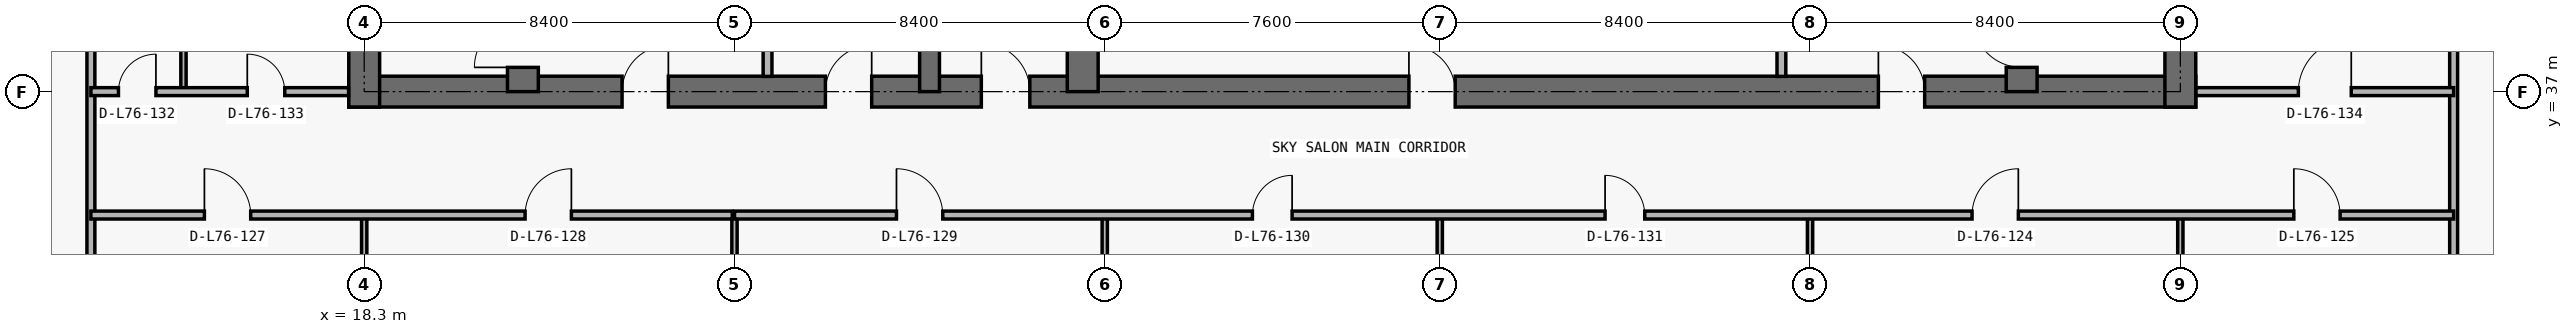
"""IFC4 building model, lengths in metres.
Left out: names, types, materials, properties, quantities, classifications, styles, units other than length and angle.
Written with IfcOpenShell. Run it as: python <this file> out.ifc"""

import sys

from ifc_helpers import new_model, si_unit, direction, frame, frame_2d, origin, place, context, subcontext, project, spatial, rectangle, extrude, element, fill, save


model = new_model("IFC4")
c1 = context("Model", 3, precision=1e-05, world=origin(), true_north=direction((0.0, 1.0)))
c2 = subcontext(c1, "Body", "Model", "MODEL_VIEW")
j1 = project(units=[si_unit("LENGTHUNIT", "METRE"), si_unit("PLANEANGLEUNIT", "RADIAN")], contexts=[c1])
p1 = place(None, origin())
s1 = spatial("IfcSite", under=j1, at=p1, CompositionType="ELEMENT")
p2 = place(p1, origin())
s2 = spatial("IfcBuilding", under=s1, at=p2, CompositionType="ELEMENT")
p3 = place(p2, frame((0.0, 0.0, 269.4)))
s3 = spatial("IfcBuildingStorey", under=s2, at=p3, CompositionType="ELEMENT", Elevation=269.4)
p4 = place(p3, frame((17.95, 37.0, 0.0), z_axis=(0.0, 0.0, 1.0), x_axis=(1.0, 0.0, 0.0)))
e1 = element("IfcWall", 1, at=p4, inside=s3, PredefinedType="SHEAR", context=c2, shape_type="SweptSolid", body=[
    extrude(rectangle(XDim=41.9, YDim=0.7, at=frame_2d((20.95, 0.0))), origin(), (0.0, 0.0, 1.0), 4.5),
])
p5 = place(p4, frame((14.35, 0.0, 0.0)))
e2 = element("IfcOpeningElement", 2, at=p5, cuts=e1, PredefinedType="OPENING", context=c2, shape_type="SweptSolid", body=[
    extrude(rectangle(XDim=1.1, YDim=2.15, at=frame_2d((0.55, 1.075))), frame((0.0, 0.36, 0.0), z_axis=(0.0, -1.0, 0.0), x_axis=(1.0, 0.0, 0.0)), (0.0, 0.0, 1.0), 0.72),
])
p6 = place(p4, frame((6.2, 0.0, 0.0)))
e3 = element("IfcOpeningElement", 3, at=p6, cuts=e1, PredefinedType="OPENING", context=c2, shape_type="SweptSolid", body=[
    extrude(rectangle(XDim=1.05, YDim=2.15, at=frame_2d((0.525, 1.075))), frame((0.0, 0.36, 0.0), z_axis=(0.0, -1.0, 0.0), x_axis=(1.0, 0.0, 0.0)), (0.0, 0.0, 1.0), 0.72),
])
p7 = place(p4, frame((34.7, 0.0, 0.0)))
e4 = element("IfcOpeningElement", 4, at=p7, cuts=e1, PredefinedType="OPENING", context=c2, shape_type="SweptSolid", body=[
    extrude(rectangle(XDim=1.05, YDim=2.15, at=frame_2d((0.525, 1.075))), frame((0.0, 0.36, 0.0), z_axis=(0.0, -1.0, 0.0), x_axis=(1.0, 0.0, 0.0)), (0.0, 0.0, 1.0), 0.72),
])
p8 = place(p4, frame((10.812, 0.0, 0.0)))
e5 = element("IfcOpeningElement", 5, at=p8, cuts=e1, PredefinedType="OPENING", context=c2, shape_type="SweptSolid", body=[
    extrude(rectangle(XDim=1.05, YDim=2.15, at=frame_2d((0.525, 1.075))), frame((0.0, 0.36, 0.0), z_axis=(0.0, -1.0, 0.0), x_axis=(1.0, 0.0, 0.0)), (0.0, 0.0, 1.0), 0.72),
])
p9 = place(p4, frame((24.05, 0.0, 0.0)))
e6 = element("IfcOpeningElement", 6, at=p9, cuts=e1, PredefinedType="OPENING", context=c2, shape_type="SweptSolid", body=[
    extrude(rectangle(XDim=1.05, YDim=2.15, at=frame_2d((0.525, 1.075))), frame((0.0, 0.36, 0.0), z_axis=(0.0, -1.0, 0.0), x_axis=(1.0, 0.0, 0.0)), (0.0, 0.0, 1.0), 0.72),
])
for number, where, z_axis, x_axis in (
    (7, (18.3, 36.65, 0.0), (0.0, 0.0, 1.0), (0.0, 1.0, 0.0)),
    (8, (59.5, 36.65, 0.0), (0.0, 0.0, 1.0), (0.0, 1.0, 0.0)),
):
    element("IfcWall", number, at=place(p3, frame(where, z_axis=z_axis, x_axis=x_axis)), inside=s3, PredefinedType="SHEAR", context=c2, shape_type="SweptSolid", body=[
        extrude(rectangle(XDim=13.95, YDim=0.7, at=frame_2d((6.975, 0.0))), origin(), (0.0, 0.0, 1.0), 4.5),
    ])
p10 = place(p3, frame((21.9, 37.0, 0.0), z_axis=(0.0, 0.0, 1.0), x_axis=(0.0, 1.0, 0.0)))
e9 = element("IfcWall", 9, at=p10, inside=s3, PredefinedType="SHEAR", context=c2, shape_type="SweptSolid", body=[
    extrude(rectangle(XDim=9.575, YDim=0.7, at=frame_2d((4.788, 0.0))), origin(), (0.0, 0.0, 1.0), 4.5),
])
p11 = place(p10, frame((0.55, 0.0, 0.0)))
e10 = element("IfcOpeningElement", 10, at=p11, cuts=e9, PredefinedType="OPENING", context=c2, shape_type="SweptSolid", body=[
    extrude(rectangle(XDim=1.1, YDim=2.15, at=frame_2d((0.55, 1.075))), frame((0.0, 0.36, 0.0), z_axis=(0.0, -1.0, 0.0), x_axis=(1.0, 0.0, 0.0)), (0.0, 0.0, 1.0), 0.72),
])
p12 = place(p3, frame((55.9, 37.0, 0.0), z_axis=(0.0, 0.0, 1.0), x_axis=(0.0, 1.0, 0.0)))
e11 = element("IfcWall", 11, at=p12, inside=s3, PredefinedType="SHEAR", context=c2, shape_type="SweptSolid", body=[
    extrude(rectangle(XDim=9.575, YDim=0.7, at=frame_2d((4.788, 0.0))), origin(), (0.0, 0.0, 1.0), 4.5),
])
p13 = place(p12, frame((0.55, 0.0, 0.0)))
e12 = element("IfcOpeningElement", 12, at=p13, cuts=e11, PredefinedType="OPENING", context=c2, shape_type="SweptSolid", body=[
    extrude(rectangle(XDim=1.1, YDim=2.15, at=frame_2d((0.55, 1.075))), frame((0.0, 0.36, 0.0), z_axis=(0.0, -1.0, 0.0), x_axis=(1.0, 0.0, 0.0)), (0.0, 0.0, 1.0), 0.72),
])
p14 = place(p3, frame((31.125, 37.0, 0.0), z_axis=(0.0, 0.0, 1.0), x_axis=(0.0, 1.0, 0.0)))
e13 = element("IfcWall", 13, at=p14, inside=s3, PredefinedType="SHEAR", context=c2, shape_type="SweptSolid", body=[
    extrude(rectangle(XDim=9.575, YDim=0.45, at=frame_2d((4.788, 0.0))), origin(), (0.0, 0.0, 1.0), 4.5),
])
p15 = place(p3, frame((34.6, 37.0, 0.0), z_axis=(0.0, 0.0, 1.0), x_axis=(0.0, 1.0, 0.0)))
e14 = element("IfcWall", 14, at=p15, inside=s3, PredefinedType="SHEAR", context=c2, shape_type="SweptSolid", body=[
    extrude(rectangle(XDim=9.575, YDim=0.7, at=frame_2d((4.788, 0.0))), origin(), (0.0, 0.0, 1.0), 4.5),
])
p16 = place(p3, frame((12.1, 13.385, 0.0), z_axis=(0.0, 0.0, 1.0), x_axis=(0.0, 1.0, 0.0)))
e15 = element("IfcWall", 15, at=p16, inside=s3, PredefinedType="PARTITIONING", context=c2, shape_type="SweptSolid", body=[
    extrude(rectangle(XDim=33.495, YDim=0.18, at=frame_2d((16.748, 0.0))), origin(), (0.0, 0.0, 1.0), 4.5),
])
p17 = place(p3, frame((14.2, 37.0, 0.0), z_axis=(0.0, 0.0, 1.0), x_axis=(0.0, 1.0, 0.0)))
e16 = element("IfcWall", 16, at=p17, inside=s3, PredefinedType="PARTITIONING", context=c2, shape_type="SweptSolid", body=[
    extrude(rectangle(XDim=6.8, YDim=0.12, at=frame_2d((3.4, 0.0))), origin(), (0.0, 0.0, 1.0), 4.5),
])
p18 = place(p3, frame((18.3, 9.995, 0.0), z_axis=(0.0, 0.0, 1.0), x_axis=(0.0, 1.0, 0.0)))
e17 = element("IfcWall", 17, at=p18, inside=s3, PredefinedType="PARTITIONING", context=c2, shape_type="SweptSolid", body=[
    extrude(rectangle(XDim=24.205, YDim=0.12, at=frame_2d((12.103, 0.0))), origin(), (0.0, 0.0, 1.0), 3.464),
])
p19 = place(p3, frame((26.7, 29.405, 0.0), z_axis=(0.0, 0.0, 1.0), x_axis=(0.0, 1.0, 0.0)))
e18 = element("IfcWall", 18, at=p19, inside=s3, PredefinedType="PARTITIONING", context=c2, shape_type="SweptSolid", body=[
    extrude(rectangle(XDim=4.795, YDim=0.12, at=frame_2d((2.397, 0.0))), origin(), (0.0, 0.0, 1.0), 3.785),
])
p20 = place(p3, frame((27.45, 37.345, 0.0), z_axis=(0.0, 0.0, 1.0), x_axis=(0.0, 1.0, 0.0)))
e19 = element("IfcWall", 19, at=p20, inside=s3, PredefinedType="PARTITIONING", context=c2, shape_type="SweptSolid", body=[
    extrude(rectangle(XDim=5.385, YDim=0.2, at=frame_2d((2.692, 0.0))), origin(), (0.0, 0.0, 1.0), 4.5),
])
for number, where, z_axis, x_axis in (
    (20, (35.1, 9.955, 0.0), (0.0, 0.0, 1.0), (0.0, 1.0, 0.0)),
    (21, (42.7, 9.955, 0.0), (0.0, 0.0, 1.0), (0.0, 1.0, 0.0)),
):
    element("IfcWall", number, at=place(p3, frame(where, z_axis=z_axis, x_axis=x_axis)), inside=s3, PredefinedType="PARTITIONING", context=c2, shape_type="SweptSolid", body=[
        extrude(rectangle(XDim=24.245, YDim=0.12, at=frame_2d((12.123, 0.0))), origin(), (0.0, 0.0, 1.0), 3.464),
    ])
p21 = place(p3, frame((50.45, 37.345, 0.0), z_axis=(0.0, 0.0, 1.0), x_axis=(0.0, 1.0, 0.0)))
e22 = element("IfcWall", 22, at=p21, inside=s3, PredefinedType="PARTITIONING", context=c2, shape_type="SweptSolid", body=[
    extrude(rectangle(XDim=5.385, YDim=0.2, at=frame_2d((2.692, 0.0))), origin(), (0.0, 0.0, 1.0), 4.5),
])
p22 = place(p3, frame((51.1, 29.405, 0.0), z_axis=(0.0, 0.0, 1.0), x_axis=(0.0, 1.0, 0.0)))
e23 = element("IfcWall", 23, at=p22, inside=s3, PredefinedType="PARTITIONING", context=c2, shape_type="SweptSolid", body=[
    extrude(rectangle(XDim=4.795, YDim=0.12, at=frame_2d((2.397, 0.0))), origin(), (0.0, 0.0, 1.0), 3.785),
])
p23 = place(p3, frame((59.5, 9.995, 0.0), z_axis=(0.0, 0.0, 1.0), x_axis=(0.0, 1.0, 0.0)))
e24 = element("IfcWall", 24, at=p23, inside=s3, PredefinedType="PARTITIONING", context=c2, shape_type="SweptSolid", body=[
    extrude(rectangle(XDim=24.205, YDim=0.12, at=frame_2d((12.103, 0.0))), origin(), (0.0, 0.0, 1.0), 3.464),
])
p24 = place(p3, frame((65.7, 13.42, 0.0), z_axis=(0.0, 0.0, 1.0), x_axis=(0.0, 1.0, 0.0)))
e25 = element("IfcWall", 25, at=p24, inside=s3, PredefinedType="PARTITIONING", context=c2, shape_type="SweptSolid", body=[
    extrude(rectangle(XDim=33.46, YDim=0.18, at=frame_2d((16.73, 0.0))), origin(), (0.0, 0.0, 1.0), 4.5),
])
p25 = place(p3, frame((12.1, 34.2, 0.0), z_axis=(0.0, 0.0, 1.0), x_axis=(1.0, 0.0, 0.0)))
e26 = element("IfcWall", 26, at=p25, inside=s3, PredefinedType="PARTITIONING", context=c2, shape_type="SweptSolid", body=[
    extrude(rectangle(XDim=14.55, YDim=0.18, at=frame_2d((7.275, 0.0))), origin(), (0.0, 0.0, 1.0), 4.5),
])
p26 = place(p25, frame((2.575, 0.0, 0.0)))
e27 = element("IfcOpeningElement", 27, at=p26, cuts=e26, PredefinedType="OPENING", context=c2, shape_type="SweptSolid", body=[
    extrude(rectangle(XDim=1.05, YDim=2.15, at=frame_2d((0.525, 1.075))), frame((0.0, 0.1, 0.0), z_axis=(0.0, -1.0, 0.0), x_axis=(1.0, 0.0, 0.0)), (0.0, 0.0, 1.0), 0.2),
])
p27 = place(p25, frame((9.85, 0.0, 0.0)))
e28 = element("IfcOpeningElement", 28, at=p27, cuts=e26, PredefinedType="OPENING", context=c2, shape_type="SweptSolid", body=[
    extrude(rectangle(XDim=1.05, YDim=2.15, at=frame_2d((0.525, 1.075))), frame((0.0, 0.1, 0.0), z_axis=(0.0, -1.0, 0.0), x_axis=(1.0, 0.0, 0.0)), (0.0, 0.0, 1.0), 0.2),
])
p28 = place(p3, frame((26.7, 34.2, 0.0), z_axis=(0.0, 0.0, 1.0), x_axis=(1.0, 0.0, 0.0)))
e29 = element("IfcWall", 29, at=p28, inside=s3, PredefinedType="PARTITIONING", context=c2, shape_type="SweptSolid", body=[
    extrude(rectangle(XDim=39.0, YDim=0.18, at=frame_2d((19.5, 0.0))), origin(), (0.0, 0.0, 1.0), 4.5),
])
p29 = place(p28, frame((28.075, 0.0, 0.0)))
e30 = element("IfcOpeningElement", 30, at=p29, cuts=e29, PredefinedType="OPENING", context=c2, shape_type="SweptSolid", body=[
    extrude(rectangle(XDim=1.05, YDim=2.15, at=frame_2d((0.525, 1.075))), frame((0.0, 0.1, 0.0), z_axis=(0.0, -1.0, 0.0), x_axis=(1.0, 0.0, 0.0)), (0.0, 0.0, 1.0), 0.2),
])
p30 = place(p28, frame((35.375, 0.0, 0.0)))
e31 = element("IfcOpeningElement", 31, at=p30, cuts=e29, PredefinedType="OPENING", context=c2, shape_type="SweptSolid", body=[
    extrude(rectangle(XDim=1.05, YDim=2.15, at=frame_2d((0.525, 1.075))), frame((0.0, 0.1, 0.0), z_axis=(0.0, -1.0, 0.0), x_axis=(1.0, 0.0, 0.0)), (0.0, 0.0, 1.0), 0.2),
])
p31 = place(p28, frame((3.675, 0.0, 0.0)))
e32 = element("IfcOpeningElement", 32, at=p31, cuts=e29, PredefinedType="OPENING", context=c2, shape_type="SweptSolid", body=[
    extrude(rectangle(XDim=1.05, YDim=2.15, at=frame_2d((0.525, 1.075))), frame((0.0, 0.1, 0.0), z_axis=(0.0, -1.0, 0.0), x_axis=(1.0, 0.0, 0.0)), (0.0, 0.0, 1.0), 0.2),
])
p32 = place(p28, frame((11.75, 0.0, 0.0)))
e33 = element("IfcOpeningElement", 33, at=p32, cuts=e29, PredefinedType="OPENING", context=c2, shape_type="SweptSolid", body=[
    extrude(rectangle(XDim=0.9, YDim=2.15, at=frame_2d((0.45, 1.075))), frame((0.0, 0.1, 0.0), z_axis=(0.0, -1.0, 0.0), x_axis=(1.0, 0.0, 0.0)), (0.0, 0.0, 1.0), 0.2),
])
p33 = place(p28, frame((19.75, 0.0, 0.0)))
e34 = element("IfcOpeningElement", 34, at=p33, cuts=e29, PredefinedType="OPENING", context=c2, shape_type="SweptSolid", body=[
    extrude(rectangle(XDim=0.9, YDim=2.15, at=frame_2d((0.45, 1.075))), frame((0.0, 0.1, 0.0), z_axis=(0.0, -1.0, 0.0), x_axis=(1.0, 0.0, 0.0)), (0.0, 0.0, 1.0), 0.2),
])
p34 = place(p3, frame((12.1, 37.0, 0.0), z_axis=(0.0, 0.0, 1.0), x_axis=(1.0, 0.0, 0.0)))
e35 = element("IfcWall", 35, at=p34, inside=s3, PredefinedType="PARTITIONING", context=c2, shape_type="SweptSolid", body=[
    extrude(rectangle(XDim=5.845, YDim=0.18, at=frame_2d((2.922, 0.0))), origin(), (0.0, 0.0, 1.0), 4.5),
])
p35 = place(p34, frame((0.625, 0.0, 0.0)))
e36 = element("IfcOpeningElement", 36, at=p35, cuts=e35, PredefinedType="OPENING", context=c2, shape_type="SweptSolid", body=[
    extrude(rectangle(XDim=0.85, YDim=2.1, at=frame_2d((0.425, 1.05))), frame((0.0, 0.1, 0.0), z_axis=(0.0, -1.0, 0.0), x_axis=(1.0, 0.0, 0.0)), (0.0, 0.0, 1.0), 0.2),
])
p36 = place(p34, frame((3.548, 0.0, 0.0)))
e37 = element("IfcOpeningElement", 37, at=p36, cuts=e35, PredefinedType="OPENING", context=c2, shape_type="SweptSolid", body=[
    extrude(rectangle(XDim=0.85, YDim=2.1, at=frame_2d((0.425, 1.05))), frame((0.0, 0.1, 0.0), z_axis=(0.0, -1.0, 0.0), x_axis=(1.0, 0.0, 0.0)), (0.0, 0.0, 1.0), 0.2),
])
p37 = place(p3, frame((59.855, 37.0, 0.0), z_axis=(0.0, 0.0, 1.0), x_axis=(1.0, 0.0, 0.0)))
e38 = element("IfcWall", 38, at=p37, inside=s3, PredefinedType="PARTITIONING", context=c2, shape_type="SweptSolid", body=[
    extrude(rectangle(XDim=5.845, YDim=0.18, at=frame_2d((2.922, 0.0))), origin(), (0.0, 0.0, 1.0), 4.5),
])
p38 = place(p37, frame((2.323, 0.0, 0.0)))
e39 = element("IfcOpeningElement", 39, at=p38, cuts=e38, PredefinedType="OPENING", context=c2, shape_type="SweptSolid", body=[
    extrude(rectangle(XDim=1.2, YDim=2.2, at=frame_2d((0.6, 1.1))), frame((0.0, 0.1, 0.0), z_axis=(0.0, -1.0, 0.0), x_axis=(1.0, 0.0, 0.0)), (0.0, 0.0, 1.0), 0.2),
])
p39 = place(p5, origin())
e40 = element("IfcDoor", 40, at=p39, inside=s3, OperationType="SINGLE_SWING_LEFT", PredefinedType="DOOR", context=c2, shape_type="SweptSolid", body=[
    extrude(rectangle(XDim=1.1, YDim=2.15, at=frame_2d((0.55, 1.075))), frame((0.0, 0.025, 0.0), z_axis=(0.0, -1.0, 0.0), x_axis=(1.0, 0.0, 0.0)), (0.0, 0.0, 1.0), 0.05),
])
fill(e2, e40)
p40 = place(p6, origin())
e41 = element("IfcDoor", 41, at=p40, inside=s3, OperationType="SINGLE_SWING_RIGHT", PredefinedType="DOOR", context=c2, shape_type="SweptSolid", body=[
    extrude(rectangle(XDim=1.05, YDim=2.15, at=frame_2d((0.525, 1.075))), frame((0.0, 0.025, 0.0), z_axis=(0.0, -1.0, 0.0), x_axis=(1.0, 0.0, 0.0)), (0.0, 0.0, 1.0), 0.05),
])
fill(e3, e41)
p41 = place(p11, origin())
e42 = element("IfcDoor", 42, at=p41, inside=s3, OperationType="SINGLE_SWING_LEFT", PredefinedType="DOOR", context=c2, shape_type="SweptSolid", body=[
    extrude(rectangle(XDim=1.1, YDim=2.15, at=frame_2d((0.55, 1.075))), frame((0.0, 0.025, 0.0), z_axis=(0.0, -1.0, 0.0), x_axis=(1.0, 0.0, 0.0)), (0.0, 0.0, 1.0), 0.05),
])
fill(e10, e42)
p42 = place(p7, origin())
e43 = element("IfcDoor", 43, at=p42, inside=s3, OperationType="SINGLE_SWING_LEFT", PredefinedType="DOOR", context=c2, shape_type="SweptSolid", body=[
    extrude(rectangle(XDim=1.05, YDim=2.15, at=frame_2d((0.525, 1.075))), frame((0.0, 0.025, 0.0), z_axis=(0.0, -1.0, 0.0), x_axis=(1.0, 0.0, 0.0)), (0.0, 0.0, 1.0), 0.05),
])
fill(e4, e43)
p43 = place(p13, origin())
e44 = element("IfcDoor", 44, at=p43, inside=s3, OperationType="SINGLE_SWING_RIGHT", PredefinedType="DOOR", context=c2, shape_type="SweptSolid", body=[
    extrude(rectangle(XDim=1.1, YDim=2.15, at=frame_2d((0.55, 1.075))), frame((0.0, 0.025, 0.0), z_axis=(0.0, -1.0, 0.0), x_axis=(1.0, 0.0, 0.0)), (0.0, 0.0, 1.0), 0.05),
])
fill(e12, e44)
p44 = place(p8, origin())
e45 = element("IfcDoor", 45, at=p44, inside=s3, OperationType="SINGLE_SWING_RIGHT", PredefinedType="DOOR", context=c2, shape_type="SweptSolid", body=[
    extrude(rectangle(XDim=1.05, YDim=2.15, at=frame_2d((0.525, 1.075))), frame((0.0, 0.025, 0.0), z_axis=(0.0, -1.0, 0.0), x_axis=(1.0, 0.0, 0.0)), (0.0, 0.0, 1.0), 0.05),
])
fill(e5, e45)
p45 = place(p9, origin())
e46 = element("IfcDoor", 46, at=p45, inside=s3, OperationType="SINGLE_SWING_LEFT", PredefinedType="DOOR", context=c2, shape_type="SweptSolid", body=[
    extrude(rectangle(XDim=1.05, YDim=2.15, at=frame_2d((0.525, 1.075))), frame((0.0, 0.025, 0.0), z_axis=(0.0, -1.0, 0.0), x_axis=(1.0, 0.0, 0.0)), (0.0, 0.0, 1.0), 0.05),
])
fill(e6, e46)
p46 = place(p29, origin())
e47 = element("IfcDoor", 47, at=p46, inside=s3, OperationType="SINGLE_SWING_RIGHT", PredefinedType="DOOR", context=c2, shape_type="SweptSolid", body=[
    extrude(rectangle(XDim=1.05, YDim=2.15, at=frame_2d((0.525, 1.075))), frame((0.0, 0.025, 0.0), z_axis=(0.0, -1.0, 0.0), x_axis=(1.0, 0.0, 0.0)), (0.0, 0.0, 1.0), 0.05),
])
fill(e30, e47)
p47 = place(p30, origin())
e48 = element("IfcDoor", 48, at=p47, inside=s3, OperationType="SINGLE_SWING_LEFT", PredefinedType="DOOR", context=c2, shape_type="SweptSolid", body=[
    extrude(rectangle(XDim=1.05, YDim=2.15, at=frame_2d((0.525, 1.075))), frame((0.0, 0.025, 0.0), z_axis=(0.0, -1.0, 0.0), x_axis=(1.0, 0.0, 0.0)), (0.0, 0.0, 1.0), 0.05),
])
fill(e31, e48)
p48 = place(p26, origin())
e49 = element("IfcDoor", 49, at=p48, inside=s3, OperationType="SINGLE_SWING_LEFT", PredefinedType="DOOR", context=c2, shape_type="SweptSolid", body=[
    extrude(rectangle(XDim=1.05, YDim=2.15, at=frame_2d((0.525, 1.075))), frame((0.0, 0.025, 0.0), z_axis=(0.0, -1.0, 0.0), x_axis=(1.0, 0.0, 0.0)), (0.0, 0.0, 1.0), 0.05),
])
fill(e27, e49)
p49 = place(p27, origin())
e50 = element("IfcDoor", 50, at=p49, inside=s3, OperationType="SINGLE_SWING_RIGHT", PredefinedType="DOOR", context=c2, shape_type="SweptSolid", body=[
    extrude(rectangle(XDim=1.05, YDim=2.15, at=frame_2d((0.525, 1.075))), frame((0.0, 0.025, 0.0), z_axis=(0.0, -1.0, 0.0), x_axis=(1.0, 0.0, 0.0)), (0.0, 0.0, 1.0), 0.05),
])
fill(e28, e50)
p50 = place(p31, origin())
e51 = element("IfcDoor", 51, at=p50, inside=s3, OperationType="SINGLE_SWING_LEFT", PredefinedType="DOOR", context=c2, shape_type="SweptSolid", body=[
    extrude(rectangle(XDim=1.05, YDim=2.15, at=frame_2d((0.525, 1.075))), frame((0.0, 0.025, 0.0), z_axis=(0.0, -1.0, 0.0), x_axis=(1.0, 0.0, 0.0)), (0.0, 0.0, 1.0), 0.05),
])
fill(e32, e51)
p51 = place(p32, origin())
e52 = element("IfcDoor", 52, at=p51, inside=s3, OperationType="SINGLE_SWING_RIGHT", PredefinedType="DOOR", context=c2, shape_type="SweptSolid", body=[
    extrude(rectangle(XDim=0.9, YDim=2.15, at=frame_2d((0.45, 1.075))), frame((0.0, 0.025, 0.0), z_axis=(0.0, -1.0, 0.0), x_axis=(1.0, 0.0, 0.0)), (0.0, 0.0, 1.0), 0.05),
])
fill(e33, e52)
p52 = place(p33, origin())
e53 = element("IfcDoor", 53, at=p52, inside=s3, OperationType="SINGLE_SWING_LEFT", PredefinedType="DOOR", context=c2, shape_type="SweptSolid", body=[
    extrude(rectangle(XDim=0.9, YDim=2.15, at=frame_2d((0.45, 1.075))), frame((0.0, 0.025, 0.0), z_axis=(0.0, -1.0, 0.0), x_axis=(1.0, 0.0, 0.0)), (0.0, 0.0, 1.0), 0.05),
])
fill(e34, e53)
p53 = place(p35, origin())
e54 = element("IfcDoor", 54, at=p53, inside=s3, OperationType="SINGLE_SWING_RIGHT", PredefinedType="DOOR", context=c2, shape_type="SweptSolid", body=[
    extrude(rectangle(XDim=0.85, YDim=2.1, at=frame_2d((0.425, 1.05))), frame((0.0, 0.025, 0.0), z_axis=(0.0, -1.0, 0.0), x_axis=(1.0, 0.0, 0.0)), (0.0, 0.0, 1.0), 0.05),
])
fill(e36, e54)
p54 = place(p36, origin())
e55 = element("IfcDoor", 55, at=p54, inside=s3, OperationType="SINGLE_SWING_LEFT", PredefinedType="DOOR", context=c2, shape_type="SweptSolid", body=[
    extrude(rectangle(XDim=0.85, YDim=2.1, at=frame_2d((0.425, 1.05))), frame((0.0, 0.025, 0.0), z_axis=(0.0, -1.0, 0.0), x_axis=(1.0, 0.0, 0.0)), (0.0, 0.0, 1.0), 0.05),
])
fill(e37, e55)
p55 = place(p38, origin())
e56 = element("IfcDoor", 56, at=p55, inside=s3, OperationType="SINGLE_SWING_RIGHT", PredefinedType="DOOR", context=c2, shape_type="SweptSolid", body=[
    extrude(rectangle(XDim=1.2, YDim=2.2, at=frame_2d((0.6, 1.1))), frame((0.0, 0.025, 0.0), z_axis=(0.0, -1.0, 0.0), x_axis=(1.0, 0.0, 0.0)), (0.0, 0.0, 1.0), 0.05),
])
fill(e39, e56)
save(model, sys.argv[1])
